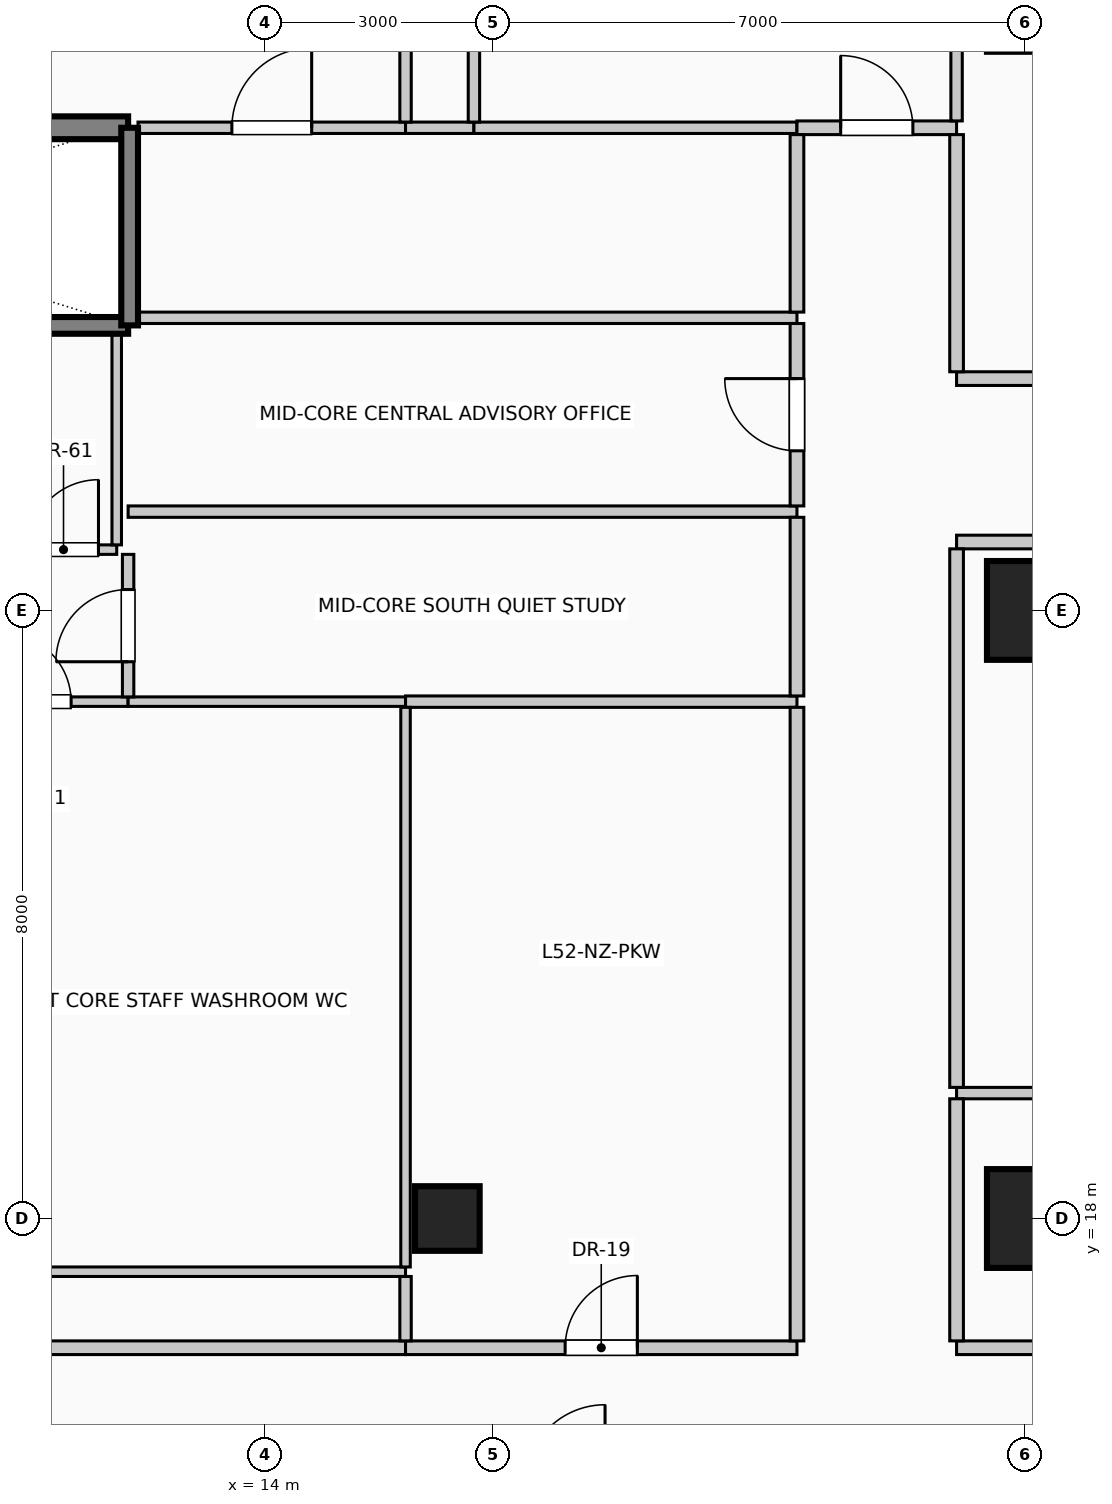
"""IFC4 building model, lengths in metres.
Left out: names, types, materials, properties, quantities, classifications, styles, units other than length and angle.
Written with IfcOpenShell. Run it as: python <this file> out.ifc"""

import sys

from ifc_helpers import new_model, si_unit, direction, frame, frame_2d, origin, origin_2d, place, context, subcontext, project, spatial, rectangle, circle, extrude, element, fill, save


model = new_model("IFC4")
c1 = context("Model", 3, precision=1e-05, world=origin(), true_north=direction((0.0, 1.0)))
c2 = subcontext(c1, "Body", "Model", "MODEL_VIEW")
j1 = project(units=[si_unit("LENGTHUNIT", "METRE"), si_unit("PLANEANGLEUNIT", "RADIAN")], contexts=[c1])
p1 = place(None, origin())
s1 = spatial("IfcSite", under=j1, at=p1, CompositionType="ELEMENT")
p2 = place(p1, origin())
s2 = spatial("IfcBuilding", under=s1, at=p2, CompositionType="ELEMENT")
p3 = place(p2, frame((0.0, 0.0, 214.6)))
s3 = spatial("IfcBuildingStorey", under=s2, at=p3, CompositionType="ELEMENT", Elevation=214.6)
for number, where, z_axis, x_axis in (
    (1, (24.0, 18.0, 0.0), (0.0, 0.0, 1.0), (1.0, 0.0, 0.0)),
    (2, (24.0, 26.0, 0.0), (0.0, 0.0, 1.0), (1.0, 0.0, 0.0)),
    (3, (24.0, 34.0, 0.0), (0.0, 0.0, 1.0), (1.0, 0.0, 0.0)),
):
    element("IfcColumn", number, at=place(p3, frame(where, z_axis=z_axis, x_axis=x_axis)), inside=s3, PredefinedType="COLUMN", context=c2, shape_type="SweptSolid", body=[
        extrude(rectangle(XDim=1.0, YDim=1.3, at=origin_2d()), origin(), (0.0, 0.0, 1.0), 4.0),
    ])
p4 = place(p3, frame((16.4, 18.0, 0.0), z_axis=(0.0, 0.0, 1.0), x_axis=(1.0, 0.0, 0.0)))
e4 = element("IfcColumn", 4, at=p4, inside=s3, PredefinedType="COLUMN", context=c2, shape_type="SweptSolid", body=[
    extrude(circle(Radius=0.425, at=origin_2d()), origin(), (0.0, 0.0, 1.0), 4.0),
])
p5 = place(p3, frame((10.05, 32.35, 0.0), z_axis=(0.0, 0.0, 1.0), x_axis=(1.0, 0.0, 0.0)))
e5 = element("IfcWall", 5, at=p5, inside=s3, PredefinedType="SOLIDWALL", context=c2, shape_type="SweptSolid", body=[
    extrude(rectangle(XDim=2.15, YDim=0.3, at=frame_2d((1.075, 0.0))), origin(), (0.0, 0.0, 1.0), 4.0),
])
p6 = place(p3, frame((3.55, 29.75, 0.0), z_axis=(0.0, 0.0, 1.0), x_axis=(1.0, 0.0, 0.0)))
e6 = element("IfcWall", 6, at=p6, inside=s3, PredefinedType="SOLIDWALL", context=c2, shape_type="SweptSolid", body=[
    extrude(rectangle(XDim=8.65, YDim=0.22, at=frame_2d((4.325, 0.0))), origin(), (0.0, 0.0, 1.0), 4.0),
])
p7 = place(p3, frame((12.22, 29.75, 0.0), z_axis=(0.0, 0.0, 1.0), x_axis=(0.0, 1.0, 0.0)))
e7 = element("IfcWall", 7, at=p7, inside=s3, PredefinedType="SOLIDWALL", context=c2, shape_type="SweptSolid", body=[
    extrude(rectangle(XDim=2.6, YDim=0.22, at=frame_2d((1.3, 0.0))), origin(), (0.0, 0.0, 1.0), 4.0),
])
p8 = place(p3, frame((3.55, 16.3, 0.0), z_axis=(0.0, 0.0, 1.0), x_axis=(1.0, 0.0, 0.0)))
e8 = element("IfcWall", 8, at=p8, inside=s3, PredefinedType="PARTITIONING", context=c2, shape_type="SweptSolid", body=[
    extrude(rectangle(XDim=12.3, YDim=0.18, at=frame_2d((6.15, 0.0))), origin(), (0.0, 0.0, 1.0), 3.75),
])
p9 = place(p3, frame((15.85, 16.3, 0.0), z_axis=(0.0, 0.0, 1.0), x_axis=(1.0, 0.0, 0.0)))
e9 = element("IfcWall", 9, at=p9, inside=s3, PredefinedType="PARTITIONING", context=c2, shape_type="SweptSolid", body=[
    extrude(rectangle(XDim=5.15, YDim=0.18, at=frame_2d((2.575, 0.0))), origin(), (0.0, 0.0, 1.0), 3.75),
])
p10 = place(p9, frame((2.1, 0.0, 0.0)))
e10 = element("IfcOpeningElement", 10, at=p10, cuts=e9, PredefinedType="OPENING", context=c2, shape_type="SweptSolid", body=[
    extrude(rectangle(XDim=0.95, YDim=2.15, at=frame_2d((0.475, 1.075))), frame((0.0, 0.1, 0.0), z_axis=(0.0, -1.0, 0.0), x_axis=(1.0, 0.0, 0.0)), (0.0, 0.0, 1.0), 0.2),
])
p11 = place(p3, frame((23.1, 16.3, 0.0), z_axis=(0.0, 0.0, 1.0), x_axis=(1.0, 0.0, 0.0)))
e11 = element("IfcWall", 11, at=p11, inside=s3, PredefinedType="PARTITIONING", context=c2, shape_type="SweptSolid", body=[
    extrude(rectangle(XDim=11.65, YDim=0.18, at=frame_2d((5.825, 0.0))), origin(), (0.0, 0.0, 1.0), 3.75),
])
p12 = place(p3, frame((9.8, 17.3, 0.0), z_axis=(0.0, 0.0, 1.0), x_axis=(1.0, 0.0, 0.0)))
e12 = element("IfcWall", 12, at=p12, inside=s3, PredefinedType="PARTITIONING", context=c2, shape_type="SweptSolid", body=[
    extrude(rectangle(XDim=6.05, YDim=0.125, at=frame_2d((3.025, 0.0))), origin(), (0.0, 0.0, 1.0), 3.75),
])
p13 = place(p3, frame((23.1, 19.65, 0.0), z_axis=(0.0, 0.0, 1.0), x_axis=(1.0, 0.0, 0.0)))
e13 = element("IfcWall", 13, at=p13, inside=s3, PredefinedType="PARTITIONING", context=c2, shape_type="SweptSolid", body=[
    extrude(rectangle(XDim=11.65, YDim=0.15, at=frame_2d((5.825, 0.0))), origin(), (0.0, 0.0, 1.0), 3.75),
])
p14 = place(p3, frame((9.8, 24.8, 0.0), z_axis=(0.0, 0.0, 1.0), x_axis=(1.0, 0.0, 0.0)))
e14 = element("IfcWall", 14, at=p14, inside=s3, PredefinedType="PARTITIONING", context=c2, shape_type="SweptSolid", body=[
    extrude(rectangle(XDim=2.4, YDim=0.125, at=frame_2d((1.2, 0.0))), origin(), (0.0, 0.0, 1.0), 3.75),
])
p15 = place(p14, frame((0.75, 0.0, 0.0)))
e15 = element("IfcOpeningElement", 15, at=p15, cuts=e14, PredefinedType="OPENING", context=c2, shape_type="SweptSolid", body=[
    extrude(rectangle(XDim=0.9, YDim=2.1, at=frame_2d((0.45, 1.05))), frame((0.0, 0.073, 0.0), z_axis=(0.0, -1.0, 0.0), x_axis=(1.0, 0.0, 0.0)), (0.0, 0.0, 1.0), 0.145),
])
p16 = place(p3, frame((12.2, 24.8, 0.0), z_axis=(0.0, 0.0, 1.0), x_axis=(1.0, 0.0, 0.0)))
e16 = element("IfcWall", 16, at=p16, inside=s3, PredefinedType="PARTITIONING", context=c2, shape_type="SweptSolid", body=[
    extrude(rectangle(XDim=3.65, YDim=0.125, at=frame_2d((1.825, 0.0))), origin(), (0.0, 0.0, 1.0), 3.75),
])
p17 = place(p3, frame((15.85, 24.8, 0.0), z_axis=(0.0, 0.0, 1.0), x_axis=(1.0, 0.0, 0.0)))
e17 = element("IfcWall", 17, at=p17, inside=s3, PredefinedType="PARTITIONING", context=c2, shape_type="SweptSolid", body=[
    extrude(rectangle(XDim=5.15, YDim=0.15, at=frame_2d((2.575, 0.0))), origin(), (0.0, 0.0, 1.0), 3.75),
])
p18 = place(p3, frame((10.65, 26.8, 0.0), z_axis=(0.0, 0.0, 1.0), x_axis=(1.0, 0.0, 0.0)))
e18 = element("IfcWall", 18, at=p18, inside=s3, PredefinedType="PARTITIONING", context=c2, shape_type="SweptSolid", body=[
    extrude(rectangle(XDim=1.4, YDim=0.125, at=frame_2d((0.7, 0.0))), origin(), (0.0, 0.0, 1.0), 3.75),
])
p19 = place(p18, frame((0.24, 0.0, 0.0)))
e19 = element("IfcOpeningElement", 19, at=p19, cuts=e18, PredefinedType="OPENING", context=c2, shape_type="SweptSolid", body=[
    extrude(rectangle(XDim=0.92, YDim=2.1, at=frame_2d((0.46, 1.05))), frame((0.0, 0.073, 0.0), z_axis=(0.0, -1.0, 0.0), x_axis=(1.0, 0.0, 0.0)), (0.0, 0.0, 1.0), 0.145),
])
p20 = place(p3, frame((23.1, 26.9, 0.0), z_axis=(0.0, 0.0, 1.0), x_axis=(1.0, 0.0, 0.0)))
e20 = element("IfcWall", 20, at=p20, inside=s3, PredefinedType="PARTITIONING", context=c2, shape_type="SweptSolid", body=[
    extrude(rectangle(XDim=11.65, YDim=0.18, at=frame_2d((5.825, 0.0))), origin(), (0.0, 0.0, 1.0), 3.75),
])
p21 = place(p20, frame((5.3, 0.0, 0.0)))
e21 = element("IfcOpeningElement", 21, at=p21, cuts=e20, PredefinedType="OPENING", context=c2, shape_type="SweptSolid", body=[
    extrude(rectangle(XDim=1.05, YDim=2.15, at=frame_2d((0.525, 1.075))), frame((0.0, 0.1, 0.0), z_axis=(0.0, -1.0, 0.0), x_axis=(1.0, 0.0, 0.0)), (0.0, 0.0, 1.0), 0.2),
])
p22 = place(p3, frame((12.2, 27.3, 0.0), z_axis=(0.0, 0.0, 1.0), x_axis=(1.0, 0.0, 0.0)))
e22 = element("IfcWall", 22, at=p22, inside=s3, PredefinedType="PARTITIONING", context=c2, shape_type="SweptSolid", body=[
    extrude(rectangle(XDim=8.8, YDim=0.15, at=frame_2d((4.4, 0.0))), origin(), (0.0, 0.0, 1.0), 3.75),
])
p23 = place(p3, frame((23.1, 29.05, 0.0), z_axis=(0.0, 0.0, 1.0), x_axis=(1.0, 0.0, 0.0)))
e23 = element("IfcWall", 23, at=p23, inside=s3, PredefinedType="PARTITIONING", context=c2, shape_type="SweptSolid", body=[
    extrude(rectangle(XDim=4.99, YDim=0.18, at=frame_2d((2.495, 0.0))), origin(), (0.0, 0.0, 1.0), 3.75),
])
p24 = place(p23, frame((2.02, 0.0, 0.0)))
e24 = element("IfcOpeningElement", 24, at=p24, cuts=e23, PredefinedType="OPENING", context=c2, shape_type="SweptSolid", body=[
    extrude(rectangle(XDim=0.95, YDim=2.15, at=frame_2d((0.475, 1.075))), frame((0.0, 0.1, 0.0), z_axis=(0.0, -1.0, 0.0), x_axis=(1.0, 0.0, 0.0)), (0.0, 0.0, 1.0), 0.2),
])
p25 = place(p3, frame((12.33, 29.85, 0.0), z_axis=(0.0, 0.0, 1.0), x_axis=(1.0, 0.0, 0.0)))
e25 = element("IfcWall", 25, at=p25, inside=s3, PredefinedType="PARTITIONING", context=c2, shape_type="SweptSolid", body=[
    extrude(rectangle(XDim=8.67, YDim=0.15, at=frame_2d((4.335, 0.0))), origin(), (0.0, 0.0, 1.0), 3.75),
])
p26 = place(p3, frame((12.33, 32.35, 0.0), z_axis=(0.0, 0.0, 1.0), x_axis=(1.0, 0.0, 0.0)))
e26 = element("IfcWall", 26, at=p26, inside=s3, PredefinedType="PARTITIONING", context=c2, shape_type="SweptSolid", body=[
    extrude(rectangle(XDim=3.52, YDim=0.15, at=frame_2d((1.76, 0.0))), origin(), (0.0, 0.0, 1.0), 3.75),
])
p27 = place(p26, frame((1.235, 0.0, 0.0)))
e27 = element("IfcOpeningElement", 27, at=p27, cuts=e26, PredefinedType="OPENING", context=c2, shape_type="SweptSolid", body=[
    extrude(rectangle(XDim=1.05, YDim=2.15, at=frame_2d((0.525, 1.075))), frame((0.0, 0.085, 0.0), z_axis=(0.0, -1.0, 0.0), x_axis=(1.0, 0.0, 0.0)), (0.0, 0.0, 1.0), 0.17),
])
p28 = place(p3, frame((15.85, 32.35, 0.0), z_axis=(0.0, 0.0, 1.0), x_axis=(1.0, 0.0, 0.0)))
e28 = element("IfcWall", 28, at=p28, inside=s3, PredefinedType="PARTITIONING", context=c2, shape_type="SweptSolid", body=[
    extrude(rectangle(XDim=0.9, YDim=0.15, at=frame_2d((0.45, 0.0))), origin(), (0.0, 0.0, 1.0), 3.75),
])
p29 = place(p3, frame((16.75, 32.35, 0.0), z_axis=(0.0, 0.0, 1.0), x_axis=(1.0, 0.0, 0.0)))
e29 = element("IfcWall", 29, at=p29, inside=s3, PredefinedType="PARTITIONING", context=c2, shape_type="SweptSolid", body=[
    extrude(rectangle(XDim=4.25, YDim=0.15, at=frame_2d((2.125, 0.0))), origin(), (0.0, 0.0, 1.0), 3.75),
])
p30 = place(p3, frame((21.0, 32.35, 0.0), z_axis=(0.0, 0.0, 1.0), x_axis=(1.0, 0.0, 0.0)))
e30 = element("IfcWall", 30, at=p30, inside=s3, PredefinedType="PARTITIONING", context=c2, shape_type="SweptSolid", body=[
    extrude(rectangle(XDim=2.1, YDim=0.18, at=frame_2d((1.05, 0.0))), origin(), (0.0, 0.0, 1.0), 3.75),
])
p31 = place(p30, frame((0.575, 0.0, 0.0)))
e31 = element("IfcOpeningElement", 31, at=p31, cuts=e30, PredefinedType="OPENING", context=c2, shape_type="SweptSolid", body=[
    extrude(rectangle(XDim=0.95, YDim=2.15, at=frame_2d((0.475, 1.075))), frame((0.0, 0.1, 0.0), z_axis=(0.0, -1.0, 0.0), x_axis=(1.0, 0.0, 0.0)), (0.0, 0.0, 1.0), 0.2),
])
p32 = place(p3, frame((12.05, 26.863, 0.0), z_axis=(0.0, 0.0, 1.0), x_axis=(0.0, 1.0, 0.0)))
e32 = element("IfcWall", 32, at=p32, inside=s3, PredefinedType="PARTITIONING", context=c2, shape_type="SweptSolid", body=[
    extrude(rectangle(XDim=2.777, YDim=0.125, at=frame_2d((1.389, 0.0))), origin(), (0.0, 0.0, 1.0), 3.75),
])
p33 = place(p3, frame((12.2, 24.863, 0.0), z_axis=(0.0, 0.0, 1.0), x_axis=(0.0, 1.0, 0.0)))
e33 = element("IfcWall", 33, at=p33, inside=s3, PredefinedType="PARTITIONING", context=c2, shape_type="SweptSolid", body=[
    extrude(rectangle(XDim=1.875, YDim=0.15, at=frame_2d((0.938, 0.0))), origin(), (0.0, 0.0, 1.0), 3.75),
])
p34 = place(p33, frame((0.462, 0.0, 0.0)))
e34 = element("IfcOpeningElement", 34, at=p34, cuts=e33, PredefinedType="OPENING", context=c2, shape_type="SweptSolid", body=[
    extrude(rectangle(XDim=0.95, YDim=2.15, at=frame_2d((0.475, 1.075))), frame((0.0, 0.085, 0.0), z_axis=(0.0, -1.0, 0.0), x_axis=(1.0, 0.0, 0.0)), (0.0, 0.0, 1.0), 0.17),
])
p35 = place(p3, frame((15.85, 16.39, 0.0), z_axis=(0.0, 0.0, 1.0), x_axis=(0.0, 1.0, 0.0)))
e35 = element("IfcWall", 35, at=p35, inside=s3, PredefinedType="PARTITIONING", context=c2, shape_type="SweptSolid", body=[
    extrude(rectangle(XDim=0.848, YDim=0.15, at=frame_2d((0.424, 0.0))), origin(), (0.0, 0.0, 1.0), 3.75),
])
p36 = place(p3, frame((15.85, 17.363, 0.0), z_axis=(0.0, 0.0, 1.0), x_axis=(0.0, 1.0, 0.0)))
e36 = element("IfcWall", 36, at=p36, inside=s3, PredefinedType="PARTITIONING", context=c2, shape_type="SweptSolid", body=[
    extrude(rectangle(XDim=7.363, YDim=0.125, at=frame_2d((3.681, 0.0))), origin(), (0.0, 0.0, 1.0), 3.75),
])
p37 = place(p3, frame((15.85, 32.425, 0.0), z_axis=(0.0, 0.0, 1.0), x_axis=(0.0, 1.0, 0.0)))
e37 = element("IfcWall", 37, at=p37, inside=s3, PredefinedType="PARTITIONING", context=c2, shape_type="SweptSolid", body=[
    extrude(rectangle(XDim=1.725, YDim=0.15, at=frame_2d((0.862, 0.0))), origin(), (0.0, 0.0, 1.0), 3.75),
])
p38 = place(p3, frame((16.75, 32.425, 0.0), z_axis=(0.0, 0.0, 1.0), x_axis=(0.0, 1.0, 0.0)))
e38 = element("IfcWall", 38, at=p38, inside=s3, PredefinedType="PARTITIONING", context=c2, shape_type="SweptSolid", body=[
    extrude(rectangle(XDim=1.15, YDim=0.15, at=frame_2d((0.575, 0.0))), origin(), (0.0, 0.0, 1.0), 3.75),
])
p39 = place(p3, frame((21.0, 16.39, 0.0), z_axis=(0.0, 0.0, 1.0), x_axis=(0.0, 1.0, 0.0)))
e39 = element("IfcWall", 39, at=p39, inside=s3, PredefinedType="PARTITIONING", context=c2, shape_type="SweptSolid", body=[
    extrude(rectangle(XDim=8.335, YDim=0.18, at=frame_2d((4.167, 0.0))), origin(), (0.0, 0.0, 1.0), 3.75),
])
p40 = place(p3, frame((21.0, 24.875, 0.0), z_axis=(0.0, 0.0, 1.0), x_axis=(0.0, 1.0, 0.0)))
e40 = element("IfcWall", 40, at=p40, inside=s3, PredefinedType="PARTITIONING", context=c2, shape_type="SweptSolid", body=[
    extrude(rectangle(XDim=2.35, YDim=0.18, at=frame_2d((1.175, 0.0))), origin(), (0.0, 0.0, 1.0), 3.75),
])
p41 = place(p3, frame((21.0, 27.375, 0.0), z_axis=(0.0, 0.0, 1.0), x_axis=(0.0, 1.0, 0.0)))
e41 = element("IfcWall", 41, at=p41, inside=s3, PredefinedType="PARTITIONING", context=c2, shape_type="SweptSolid", body=[
    extrude(rectangle(XDim=2.4, YDim=0.18, at=frame_2d((1.2, 0.0))), origin(), (0.0, 0.0, 1.0), 3.75),
])
p42 = place(p41, frame((0.725, 0.0, 0.0)))
e42 = element("IfcOpeningElement", 42, at=p42, cuts=e41, PredefinedType="OPENING", context=c2, shape_type="SweptSolid", body=[
    extrude(rectangle(XDim=0.95, YDim=2.15, at=frame_2d((0.475, 1.075))), frame((0.0, 0.1, 0.0), z_axis=(0.0, -1.0, 0.0), x_axis=(1.0, 0.0, 0.0)), (0.0, 0.0, 1.0), 0.2),
])
p43 = place(p3, frame((21.0, 29.925, 0.0), z_axis=(0.0, 0.0, 1.0), x_axis=(0.0, 1.0, 0.0)))
e43 = element("IfcWall", 43, at=p43, inside=s3, PredefinedType="PARTITIONING", context=c2, shape_type="SweptSolid", body=[
    extrude(rectangle(XDim=2.335, YDim=0.18, at=frame_2d((1.167, 0.0))), origin(), (0.0, 0.0, 1.0), 3.75),
])
p44 = place(p3, frame((23.1, 16.39, 0.0), z_axis=(0.0, 0.0, 1.0), x_axis=(0.0, 1.0, 0.0)))
e44 = element("IfcWall", 44, at=p44, inside=s3, PredefinedType="PARTITIONING", context=c2, shape_type="SweptSolid", body=[
    extrude(rectangle(XDim=3.185, YDim=0.18, at=frame_2d((1.593, 0.0))), origin(), (0.0, 0.0, 1.0), 3.75),
])
p45 = place(p3, frame((23.1, 19.725, 0.0), z_axis=(0.0, 0.0, 1.0), x_axis=(0.0, 1.0, 0.0)))
e45 = element("IfcWall", 45, at=p45, inside=s3, PredefinedType="PARTITIONING", context=c2, shape_type="SweptSolid", body=[
    extrude(rectangle(XDim=7.085, YDim=0.18, at=frame_2d((3.542, 0.0))), origin(), (0.0, 0.0, 1.0), 3.75),
])
p46 = place(p3, frame((23.1, 29.14, 0.0), z_axis=(0.0, 0.0, 1.0), x_axis=(0.0, 1.0, 0.0)))
e46 = element("IfcWall", 46, at=p46, inside=s3, PredefinedType="PARTITIONING", context=c2, shape_type="SweptSolid", body=[
    extrude(rectangle(XDim=3.12, YDim=0.18, at=frame_2d((1.56, 0.0))), origin(), (0.0, 0.0, 1.0), 3.75),
])
p47 = place(p3, frame((23.1, 32.44, 0.0), z_axis=(0.0, 0.0, 1.0), x_axis=(0.0, 1.0, 0.0)))
e47 = element("IfcWall", 47, at=p47, inside=s3, PredefinedType="PARTITIONING", context=c2, shape_type="SweptSolid", body=[
    extrude(rectangle(XDim=12.84, YDim=0.15, at=frame_2d((6.42, 0.0))), origin(), (0.0, 0.0, 1.0), 3.75),
])
p48 = place(p10, origin())
e48 = element("IfcDoor", 48, at=p48, inside=s3, OperationType="SINGLE_SWING_RIGHT", PredefinedType="DOOR", context=c2, shape_type="SweptSolid", body=[
    extrude(rectangle(XDim=0.95, YDim=2.15, at=frame_2d((0.475, 1.075))), frame((0.0, 0.025, 0.0), z_axis=(0.0, -1.0, 0.0), x_axis=(1.0, 0.0, 0.0)), (0.0, 0.0, 1.0), 0.05),
])
fill(e10, e48)
p49 = place(p15, origin())
e49 = element("IfcDoor", 49, at=p49, inside=s3, OperationType="SINGLE_SWING_LEFT", PredefinedType="DOOR", context=c2, shape_type="SweptSolid", body=[
    extrude(rectangle(XDim=0.9, YDim=2.1, at=frame_2d((0.45, 1.05))), frame((0.0, 0.025, 0.0), z_axis=(0.0, -1.0, 0.0), x_axis=(1.0, 0.0, 0.0)), (0.0, 0.0, 1.0), 0.05),
])
fill(e15, e49)
p50 = place(p19, origin())
e50 = element("IfcDoor", 50, at=p50, inside=s3, OperationType="SINGLE_SWING_RIGHT", PredefinedType="DOOR", context=c2, shape_type="SweptSolid", body=[
    extrude(rectangle(XDim=0.92, YDim=2.1, at=frame_2d((0.46, 1.05))), frame((0.0, 0.025, 0.0), z_axis=(0.0, -1.0, 0.0), x_axis=(1.0, 0.0, 0.0)), (0.0, 0.0, 1.0), 0.05),
])
fill(e19, e50)
p51 = place(p27, origin())
e51 = element("IfcDoor", 51, at=p51, inside=s3, OperationType="SINGLE_SWING_RIGHT", PredefinedType="DOOR", context=c2, shape_type="SweptSolid", body=[
    extrude(rectangle(XDim=1.05, YDim=2.15, at=frame_2d((0.525, 1.075))), frame((0.0, 0.025, 0.0), z_axis=(0.0, -1.0, 0.0), x_axis=(1.0, 0.0, 0.0)), (0.0, 0.0, 1.0), 0.05),
])
fill(e27, e51)
p52 = place(p31, origin())
e52 = element("IfcDoor", 52, at=p52, inside=s3, OperationType="SINGLE_SWING_LEFT", PredefinedType="DOOR", context=c2, shape_type="SweptSolid", body=[
    extrude(rectangle(XDim=0.95, YDim=2.15, at=frame_2d((0.475, 1.075))), frame((0.0, 0.025, 0.0), z_axis=(0.0, -1.0, 0.0), x_axis=(1.0, 0.0, 0.0)), (0.0, 0.0, 1.0), 0.05),
])
fill(e31, e52)
p53 = place(p34, origin())
e53 = element("IfcDoor", 53, at=p53, inside=s3, OperationType="SINGLE_SWING_LEFT", PredefinedType="DOOR", context=c2, shape_type="SweptSolid", body=[
    extrude(rectangle(XDim=0.95, YDim=2.15, at=frame_2d((0.475, 1.075))), frame((0.0, 0.025, 0.0), z_axis=(0.0, -1.0, 0.0), x_axis=(1.0, 0.0, 0.0)), (0.0, 0.0, 1.0), 0.05),
])
fill(e34, e53)
p54 = place(p42, origin())
e54 = element("IfcDoor", 54, at=p54, inside=s3, OperationType="SINGLE_SWING_RIGHT", PredefinedType="DOOR", context=c2, shape_type="SweptSolid", body=[
    extrude(rectangle(XDim=0.95, YDim=2.15, at=frame_2d((0.475, 1.075))), frame((0.0, 0.025, 0.0), z_axis=(0.0, -1.0, 0.0), x_axis=(1.0, 0.0, 0.0)), (0.0, 0.0, 1.0), 0.05),
])
fill(e42, e54)
save(model, sys.argv[1])
